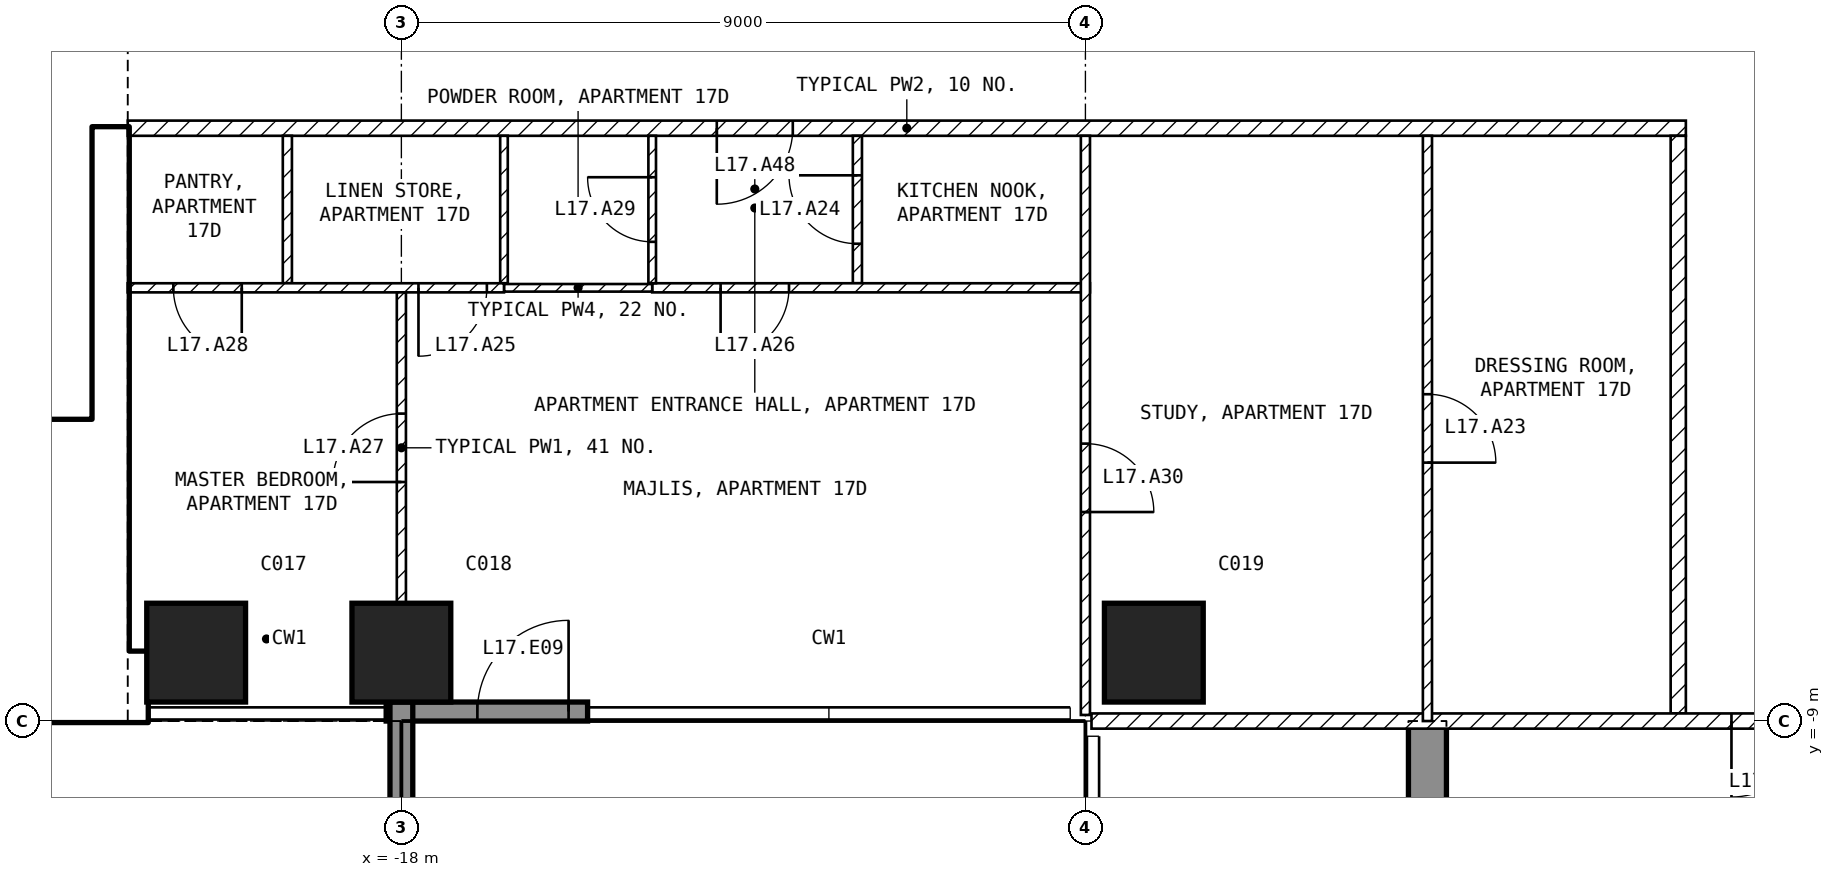
"""IFC4 building model, lengths in metres.
Left out: names, types, materials, properties, quantities, classifications, styles, units other than length and angle.
Written with IfcOpenShell. Run it as: python <this file> out.ifc"""

import sys

from ifc_helpers import new_model, si_unit, direction, frame, frame_2d, origin, origin_2d, place, context, subcontext, project, spatial, polyline, rectangle, outline, extrude, element, fill, save


model = new_model("IFC4")
c1 = context("Model", 3, precision=1e-05, world=origin(), true_north=direction((0.0, 1.0)))
c2 = subcontext(c1, "Body", "Model", "MODEL_VIEW")
j1 = project(units=[si_unit("LENGTHUNIT", "METRE"), si_unit("PLANEANGLEUNIT", "RADIAN")], contexts=[c1])
p1 = place(None, origin())
s1 = spatial("IfcSite", under=j1, at=p1, CompositionType="ELEMENT")
p2 = place(p1, origin())
s2 = spatial("IfcBuilding", under=s1, at=p2, CompositionType="ELEMENT")
p3 = place(p2, frame((0.0, 0.0, 78.5)))
s3 = spatial("IfcBuildingStorey", under=s2, at=p3, CompositionType="ELEMENT", Elevation=78.5)
for number, where, z_axis, x_axis in (
    (1, (-20.7, -8.1, -0.25), (0.0, 0.0, 1.0), (1.0, 0.0, 0.0)),
    (2, (-18.0, -8.1, -0.25), (0.0, 0.0, 1.0), (1.0, 0.0, 0.0)),
    (3, (-8.1, -8.1, -0.25), (0.0, 0.0, 1.0), (1.0, 0.0, 0.0)),
):
    element("IfcColumn", number, at=place(p3, frame(where, z_axis=z_axis, x_axis=x_axis)), inside=s3, PredefinedType="COLUMN", context=c2, shape_type="SweptSolid", body=[
        extrude(rectangle(XDim=1.3, YDim=1.3, at=origin_2d()), origin(), (0.0, 0.0, 1.0), 3.5),
    ])
p4 = place(p3, frame((-4.75, -25.45, -0.25), z_axis=(1.0, 0.0, 0.0), x_axis=(0.0, 1.0, 0.0)))
e4 = element("IfcWall", 4, at=p4, inside=s3, PredefinedType="SHEAR", context=c2, shape_type="SweptSolid", body=[
    extrude(outline(polyline([(0.0, 0.0), (4.15, 0.0), (4.15, 2.65), (6.55, 2.65), (6.55, 0.0), (11.95, 0.0), (11.95, 2.65), (14.35, 2.65), (14.35, 0.0), (16.45, 0.0), (16.45, 3.5), (0.0, 3.5), (0.0, 0.0)])), origin(), (0.0, 0.0, 1.0), 0.5),
])
p5 = place(p3, frame((-18.2, -8.875, 0.0), z_axis=(0.0, 0.0, 1.0), x_axis=(1.0, 0.0, 0.0)))
e5 = element("IfcWall", 5, at=p5, inside=s3, PredefinedType="SOLIDWALL", context=c2, shape_type="SweptSolid", body=[
    extrude(rectangle(XDim=2.65, YDim=0.25, at=frame_2d((1.325, 0.0))), origin(), (0.0, 0.0, 1.0), 3.25),
])
p6 = place(p5, frame((1.2, 0.0, 0.0)))
e6 = element("IfcOpeningElement", 6, at=p6, cuts=e5, PredefinedType="OPENING", context=c2, shape_type="SweptSolid", body=[
    extrude(rectangle(XDim=1.2, YDim=2.4, at=frame_2d((0.6, 1.2))), frame((0.0, 0.135, 0.0), z_axis=(0.0, -1.0, 0.0), x_axis=(1.0, 0.0, 0.0)), (0.0, 0.0, 1.0), 0.27),
])
p7 = place(p3, frame((-18.0, -8.75, 0.0), z_axis=(0.0, 0.0, 1.0), x_axis=(0.0, -1.0, 0.0)))
e7 = element("IfcWall", 7, at=p7, inside=s3, PredefinedType="SOLIDWALL", context=c2, shape_type="SweptSolid", body=[
    extrude(rectangle(XDim=2.95, YDim=0.3, at=frame_2d((1.475, 0.0))), origin(), (0.0, 0.0, 1.0), 3.25),
])
p8 = place(p3, frame((-32.4, -8.55, 0.0), z_axis=(0.0, 0.0, 1.0), x_axis=(1.0, 0.0, 0.0)))
e8 = element("IfcWall", 8, at=p8, inside=s3, PredefinedType="SHEAR", context=c2, shape_type="SweptSolid", body=[
    extrude(rectangle(XDim=11.05, YDim=0.9, at=frame_2d((5.525, 0.0))), origin(), (0.0, 0.0, 1.0), 3.25),
])
p9 = place(p3, frame((-21.825, -8.1, 0.0), z_axis=(0.0, 0.0, 1.0), x_axis=(0.0, 1.0, 0.0)))
e9 = element("IfcWall", 9, at=p9, inside=s3, PredefinedType="SHEAR", context=c2, shape_type="SweptSolid", body=[
    extrude(rectangle(XDim=6.9, YDim=0.45, at=frame_2d((3.45, 0.0))), origin(), (0.0, 0.0, 1.0), 3.25),
])
p10 = place(p3, frame((-28.35, -5.15, 0.0), z_axis=(0.0, 0.0, 1.0), x_axis=(1.0, 0.0, 0.0)))
e10 = element("IfcWall", 10, at=p10, inside=s3, PredefinedType="SOLIDWALL", context=c2, shape_type="SweptSolid", body=[
    extrude(rectangle(XDim=6.3, YDim=0.2, at=frame_2d((3.15, 0.0))), origin(), (0.0, 0.0, 1.0), 3.25),
])
p11 = place(p10, frame((5.1, 0.0, 0.0)))
e11 = element("IfcOpeningElement", 11, at=p11, cuts=e10, PredefinedType="OPENING", context=c2, shape_type="SweptSolid", body=[
    extrude(rectangle(XDim=1.0, YDim=2.1, at=frame_2d((0.5, 1.05))), frame((0.0, 0.11, 0.0), z_axis=(0.0, -1.0, 0.0), x_axis=(1.0, 0.0, 0.0)), (0.0, 0.0, 1.0), 0.22),
])
p12 = place(p3, frame((-1.1, -1.2, 0.0), z_axis=(0.0, 0.0, 1.0), x_axis=(-1.0, 0.0, 0.0)))
e12 = element("IfcWall", 12, at=p12, inside=s3, PredefinedType="PARTITIONING", context=c2, shape_type="SweptSolid", body=[
    extrude(rectangle(XDim=20.5, YDim=0.2, at=frame_2d((10.25, 0.0))), origin(), (0.0, 0.0, 1.0), 3.25),
])
p13 = place(p12, frame((11.75, 0.0, 0.0)))
e13 = element("IfcOpeningElement", 13, at=p13, cuts=e12, PredefinedType="OPENING", context=c2, shape_type="SweptSolid", body=[
    extrude(rectangle(XDim=1.0, YDim=2.1, at=frame_2d((0.5, 1.05))), frame((0.0, 0.11, 0.0), z_axis=(0.0, -1.0, 0.0), x_axis=(1.0, 0.0, 0.0)), (0.0, 0.0, 1.0), 0.22),
])
p14 = place(p3, frame((-1.2, -8.9, 0.0), z_axis=(0.0, 0.0, 1.0), x_axis=(0.0, 1.0, 0.0)))
e14 = element("IfcWall", 14, at=p14, inside=s3, PredefinedType="PARTITIONING", context=c2, shape_type="SweptSolid", body=[
    extrude(rectangle(XDim=7.6, YDim=0.2, at=frame_2d((3.8, 0.0))), origin(), (0.0, 0.0, 1.0), 3.25),
])
p15 = place(p3, frame((8.92, -9.0, 0.0), z_axis=(0.0, 0.0, 1.0), x_axis=(-1.0, 0.0, 0.0)))
e15 = element("IfcWall", 15, at=p15, inside=s3, PredefinedType="PARTITIONING", context=c2, shape_type="SweptSolid", body=[
    extrude(rectangle(XDim=17.84, YDim=0.2, at=frame_2d((8.92, 0.0))), origin(), (0.0, 0.0, 1.0), 3.25),
])
p16 = place(p15, frame((8.42, 0.0, 0.0)))
e16 = element("IfcOpeningElement", 16, at=p16, cuts=e15, PredefinedType="OPENING", context=c2, shape_type="SweptSolid", body=[
    extrude(rectangle(XDim=1.0, YDim=2.1, at=frame_2d((0.5, 1.05))), frame((0.0, 0.11, 0.0), z_axis=(0.0, -1.0, 0.0), x_axis=(1.0, 0.0, 0.0)), (0.0, 0.0, 1.0), 0.22),
])
p17 = place(p3, frame((-12.0, -3.24, 0.0), z_axis=(0.0, 0.0, 1.0), x_axis=(0.0, 1.0, 0.0)))
e17 = element("IfcWall", 17, at=p17, inside=s3, PredefinedType="PARTITIONING", context=c2, shape_type="SweptSolid", body=[
    extrude(rectangle(XDim=1.94, YDim=0.12, at=frame_2d((0.97, 0.0))), origin(), (0.0, 0.0, 1.0), 3.25),
])
p18 = place(p17, frame((0.52, 0.0, 0.0)))
e18 = element("IfcOpeningElement", 18, at=p18, cuts=e17, PredefinedType="OPENING", context=c2, shape_type="SweptSolid", body=[
    extrude(rectangle(XDim=0.9, YDim=2.1, at=frame_2d((0.45, 1.05))), frame((0.0, 0.07, 0.0), z_axis=(0.0, -1.0, 0.0), x_axis=(1.0, 0.0, 0.0)), (0.0, 0.0, 1.0), 0.14),
])
p19 = place(p3, frame((-8.94, -3.3, 0.0), z_axis=(0.0, 0.0, 1.0), x_axis=(-1.0, 0.0, 0.0)))
e19 = element("IfcWall", 19, at=p19, inside=s3, PredefinedType="PARTITIONING", context=c2, shape_type="SweptSolid", body=[
    extrude(rectangle(XDim=5.76, YDim=0.12, at=frame_2d((2.88, 0.0))), origin(), (0.0, 0.0, 1.0), 3.25),
])
p20 = place(p19, frame((3.96, 0.0, 0.0)))
e20 = element("IfcOpeningElement", 20, at=p20, cuts=e19, PredefinedType="OPENING", context=c2, shape_type="SweptSolid", body=[
    extrude(rectangle(XDim=0.9, YDim=2.1, at=frame_2d((0.45, 1.05))), frame((0.0, 0.07, 0.0), z_axis=(0.0, -1.0, 0.0), x_axis=(1.0, 0.0, 0.0)), (0.0, 0.0, 1.0), 0.14),
])
p21 = place(p3, frame((-9.0, -1.3, 0.0), z_axis=(0.0, 0.0, 1.0), x_axis=(0.0, -1.0, 0.0)))
e21 = element("IfcWall", 21, at=p21, inside=s3, PredefinedType="PARTITIONING", context=c2, shape_type="SweptSolid", body=[
    extrude(rectangle(XDim=7.62, YDim=0.12, at=frame_2d((3.81, 0.0))), origin(), (0.0, 0.0, 1.0), 3.25),
])
p22 = place(p21, frame((4.05, 0.0, 0.0)))
e22 = element("IfcOpeningElement", 22, at=p22, cuts=e21, PredefinedType="OPENING", context=c2, shape_type="SweptSolid", body=[
    extrude(rectangle(XDim=0.9, YDim=2.1, at=frame_2d((0.45, 1.05))), frame((0.0, 0.07, 0.0), z_axis=(0.0, -1.0, 0.0), x_axis=(1.0, 0.0, 0.0)), (0.0, 0.0, 1.0), 0.14),
])
p23 = place(p3, frame((-14.7, -3.24, 0.0), z_axis=(0.0, 0.0, 1.0), x_axis=(0.0, 1.0, 0.0)))
e23 = element("IfcWall", 23, at=p23, inside=s3, PredefinedType="PARTITIONING", context=c2, shape_type="SweptSolid", body=[
    extrude(rectangle(XDim=1.94, YDim=0.1, at=frame_2d((0.97, 0.0))), origin(), (0.0, 0.0, 1.0), 3.25),
])
p24 = place(p23, frame((0.545, 0.0, 0.0)))
e24 = element("IfcOpeningElement", 24, at=p24, cuts=e23, PredefinedType="OPENING", context=c2, shape_type="SweptSolid", body=[
    extrude(rectangle(XDim=0.85, YDim=2.1, at=frame_2d((0.425, 1.05))), frame((0.0, 0.06, 0.0), z_axis=(0.0, -1.0, 0.0), x_axis=(1.0, 0.0, 0.0)), (0.0, 0.0, 1.0), 0.12),
])
p25 = place(p3, frame((-16.65, -3.24, 0.0), z_axis=(0.0, 0.0, 1.0), x_axis=(0.0, 1.0, 0.0)))
e25 = element("IfcWall", 25, at=p25, inside=s3, PredefinedType="PARTITIONING", context=c2, shape_type="SweptSolid", body=[
    extrude(rectangle(XDim=1.94, YDim=0.1, at=frame_2d((0.97, 0.0))), origin(), (0.0, 0.0, 1.0), 3.25),
])
p26 = place(p3, frame((-14.7, -3.3, 0.0), z_axis=(0.0, 0.0, 1.0), x_axis=(-1.0, 0.0, 0.0)))
e26 = element("IfcWall", 26, at=p26, inside=s3, PredefinedType="PARTITIONING", context=c2, shape_type="SweptSolid", body=[
    extrude(rectangle(XDim=1.95, YDim=0.1, at=frame_2d((0.975, 0.0))), origin(), (0.0, 0.0, 1.0), 3.25),
])
p27 = place(p3, frame((-19.5, -3.24, 0.0), z_axis=(0.0, 0.0, 1.0), x_axis=(0.0, 1.0, 0.0)))
e27 = element("IfcWall", 27, at=p27, inside=s3, PredefinedType="PARTITIONING", context=c2, shape_type="SweptSolid", body=[
    extrude(rectangle(XDim=1.94, YDim=0.12, at=frame_2d((0.97, 0.0))), origin(), (0.0, 0.0, 1.0), 3.25),
])
p28 = place(p3, frame((-16.65, -3.3, 0.0), z_axis=(0.0, 0.0, 1.0), x_axis=(-1.0, 0.0, 0.0)))
e28 = element("IfcWall", 28, at=p28, inside=s3, PredefinedType="PARTITIONING", context=c2, shape_type="SweptSolid", body=[
    extrude(rectangle(XDim=4.95, YDim=0.12, at=frame_2d((2.475, 0.0))), origin(), (0.0, 0.0, 1.0), 3.25),
])
p29 = place(p28, frame((0.225, 0.0, 0.0)))
e29 = element("IfcOpeningElement", 29, at=p29, cuts=e28, PredefinedType="OPENING", context=c2, shape_type="SweptSolid", body=[
    extrude(rectangle(XDim=0.9, YDim=2.1, at=frame_2d((0.45, 1.05))), frame((0.0, 0.07, 0.0), z_axis=(0.0, -1.0, 0.0), x_axis=(1.0, 0.0, 0.0)), (0.0, 0.0, 1.0), 0.14),
])
p30 = place(p28, frame((3.45, 0.0, 0.0)))
e30 = element("IfcOpeningElement", 30, at=p30, cuts=e28, PredefinedType="OPENING", context=c2, shape_type="SweptSolid", body=[
    extrude(rectangle(XDim=0.9, YDim=2.1, at=frame_2d((0.45, 1.05))), frame((0.0, 0.07, 0.0), z_axis=(0.0, -1.0, 0.0), x_axis=(1.0, 0.0, 0.0)), (0.0, 0.0, 1.0), 0.14),
])
p31 = place(p3, frame((-18.0, -7.45, 0.0), z_axis=(0.0, 0.0, 1.0), x_axis=(0.0, 1.0, 0.0)))
e31 = element("IfcWall", 31, at=p31, inside=s3, PredefinedType="PARTITIONING", context=c2, shape_type="SweptSolid", body=[
    extrude(rectangle(XDim=4.09, YDim=0.12, at=frame_2d((2.045, 0.0))), origin(), (0.0, 0.0, 1.0), 2.346),
])
p32 = place(p31, frame((1.595, 0.0, 0.0)))
e32 = element("IfcOpeningElement", 32, at=p32, cuts=e31, PredefinedType="OPENING", context=c2, shape_type="SweptSolid", body=[
    extrude(rectangle(XDim=0.9, YDim=2.1, at=frame_2d((0.45, 1.05))), frame((0.0, 0.07, 0.0), z_axis=(0.0, -1.0, 0.0), x_axis=(1.0, 0.0, 0.0)), (0.0, 0.0, 1.0), 0.14),
])
p33 = place(p3, frame((-4.5, -1.3, 0.0), z_axis=(0.0, 0.0, 1.0), x_axis=(0.0, -1.0, 0.0)))
e33 = element("IfcWall", 33, at=p33, inside=s3, PredefinedType="PARTITIONING", context=c2, shape_type="SweptSolid", body=[
    extrude(rectangle(XDim=7.7, YDim=0.12, at=frame_2d((3.85, 0.0))), origin(), (0.0, 0.0, 1.0), 3.25),
])
p34 = place(p33, frame((3.4, 0.0, 0.0)))
e34 = element("IfcOpeningElement", 34, at=p34, cuts=e33, PredefinedType="OPENING", context=c2, shape_type="SweptSolid", body=[
    extrude(rectangle(XDim=0.9, YDim=2.1, at=frame_2d((0.45, 1.05))), frame((0.0, 0.07, 0.0), z_axis=(0.0, -1.0, 0.0), x_axis=(1.0, 0.0, 0.0)), (0.0, 0.0, 1.0), 0.14),
])
p35 = place(p6, origin())
e35 = element("IfcDoor", 35, at=p35, inside=s3, OperationType="SINGLE_SWING_RIGHT", PredefinedType="DOOR", context=c2, shape_type="SweptSolid", body=[
    extrude(rectangle(XDim=1.2, YDim=2.4, at=frame_2d((0.6, 1.2))), frame((0.0, 0.025, 0.0), z_axis=(0.0, -1.0, 0.0), x_axis=(1.0, 0.0, 0.0)), (0.0, 0.0, 1.0), 0.05),
])
fill(e6, e35)
p36 = place(p11, origin())
e36 = element("IfcDoor", 36, at=p36, inside=s3, OperationType="SINGLE_SWING_LEFT", PredefinedType="DOOR", context=c2, shape_type="SweptSolid", body=[
    extrude(rectangle(XDim=1.0, YDim=2.1, at=frame_2d((0.5, 1.05))), frame((0.0, 0.025, 0.0), z_axis=(0.0, -1.0, 0.0), x_axis=(1.0, 0.0, 0.0)), (0.0, 0.0, 1.0), 0.05),
])
fill(e11, e36)
p37 = place(p34, origin())
e37 = element("IfcDoor", 37, at=p37, inside=s3, OperationType="SINGLE_SWING_RIGHT", PredefinedType="DOOR", context=c2, shape_type="SweptSolid", body=[
    extrude(rectangle(XDim=0.9, YDim=2.1, at=frame_2d((0.45, 1.05))), frame((0.0, 0.025, 0.0), z_axis=(0.0, -1.0, 0.0), x_axis=(1.0, 0.0, 0.0)), (0.0, 0.0, 1.0), 0.05),
])
fill(e34, e37)
p38 = place(p18, origin())
e38 = element("IfcDoor", 38, at=p38, inside=s3, OperationType="SINGLE_SWING_RIGHT", PredefinedType="DOOR", context=c2, shape_type="SweptSolid", body=[
    extrude(rectangle(XDim=0.9, YDim=2.1, at=frame_2d((0.45, 1.05))), frame((0.0, 0.025, 0.0), z_axis=(0.0, -1.0, 0.0), x_axis=(1.0, 0.0, 0.0)), (0.0, 0.0, 1.0), 0.05),
])
fill(e18, e38)
p39 = place(p29, origin())
e39 = element("IfcDoor", 39, at=p39, inside=s3, OperationType="SINGLE_SWING_RIGHT", PredefinedType="DOOR", context=c2, shape_type="SweptSolid", body=[
    extrude(rectangle(XDim=0.9, YDim=2.1, at=frame_2d((0.45, 1.05))), frame((0.0, 0.025, 0.0), z_axis=(0.0, -1.0, 0.0), x_axis=(1.0, 0.0, 0.0)), (0.0, 0.0, 1.0), 0.05),
])
fill(e29, e39)
p40 = place(p20, origin())
e40 = element("IfcDoor", 40, at=p40, inside=s3, OperationType="SINGLE_SWING_RIGHT", PredefinedType="DOOR", context=c2, shape_type="SweptSolid", body=[
    extrude(rectangle(XDim=0.9, YDim=2.1, at=frame_2d((0.45, 1.05))), frame((0.0, 0.025, 0.0), z_axis=(0.0, -1.0, 0.0), x_axis=(1.0, 0.0, 0.0)), (0.0, 0.0, 1.0), 0.05),
])
fill(e20, e40)
p41 = place(p32, origin())
e41 = element("IfcDoor", 41, at=p41, inside=s3, OperationType="SINGLE_SWING_LEFT", PredefinedType="DOOR", context=c2, shape_type="SweptSolid", body=[
    extrude(rectangle(XDim=0.9, YDim=2.1, at=frame_2d((0.45, 1.05))), frame((0.0, 0.025, 0.0), z_axis=(0.0, -1.0, 0.0), x_axis=(1.0, 0.0, 0.0)), (0.0, 0.0, 1.0), 0.05),
])
fill(e32, e41)
p42 = place(p30, origin())
e42 = element("IfcDoor", 42, at=p42, inside=s3, OperationType="SINGLE_SWING_LEFT", PredefinedType="DOOR", context=c2, shape_type="SweptSolid", body=[
    extrude(rectangle(XDim=0.9, YDim=2.1, at=frame_2d((0.45, 1.05))), frame((0.0, 0.025, 0.0), z_axis=(0.0, -1.0, 0.0), x_axis=(1.0, 0.0, 0.0)), (0.0, 0.0, 1.0), 0.05),
])
fill(e30, e42)
p43 = place(p24, origin())
e43 = element("IfcDoor", 43, at=p43, inside=s3, OperationType="SINGLE_SWING_RIGHT", PredefinedType="DOOR", context=c2, shape_type="SweptSolid", body=[
    extrude(rectangle(XDim=0.85, YDim=2.1, at=frame_2d((0.425, 1.05))), frame((0.0, 0.025, 0.0), z_axis=(0.0, -1.0, 0.0), x_axis=(1.0, 0.0, 0.0)), (0.0, 0.0, 1.0), 0.05),
])
fill(e24, e43)
p44 = place(p22, origin())
e44 = element("IfcDoor", 44, at=p44, inside=s3, OperationType="SINGLE_SWING_RIGHT", PredefinedType="DOOR", context=c2, shape_type="SweptSolid", body=[
    extrude(rectangle(XDim=0.9, YDim=2.1, at=frame_2d((0.45, 1.05))), frame((0.0, 0.025, 0.0), z_axis=(0.0, -1.0, 0.0), x_axis=(1.0, 0.0, 0.0)), (0.0, 0.0, 1.0), 0.05),
])
fill(e22, e44)
p45 = place(p16, origin())
e45 = element("IfcDoor", 45, at=p45, inside=s3, OperationType="SINGLE_SWING_RIGHT", PredefinedType="DOOR", context=c2, shape_type="SweptSolid", body=[
    extrude(rectangle(XDim=1.0, YDim=2.1, at=frame_2d((0.5, 1.05))), frame((0.0, 0.025, 0.0), z_axis=(0.0, -1.0, 0.0), x_axis=(1.0, 0.0, 0.0)), (0.0, 0.0, 1.0), 0.05),
])
fill(e16, e45)
p46 = place(p13, origin())
e46 = element("IfcDoor", 46, at=p46, inside=s3, OperationType="SINGLE_SWING_RIGHT", PredefinedType="DOOR", context=c2, shape_type="SweptSolid", body=[
    extrude(rectangle(XDim=1.0, YDim=2.1, at=frame_2d((0.5, 1.05))), frame((0.0, 0.025, 0.0), z_axis=(0.0, -1.0, 0.0), x_axis=(1.0, 0.0, 0.0)), (0.0, 0.0, 1.0), 0.05),
])
fill(e13, e46)
save(model, sys.argv[1])
